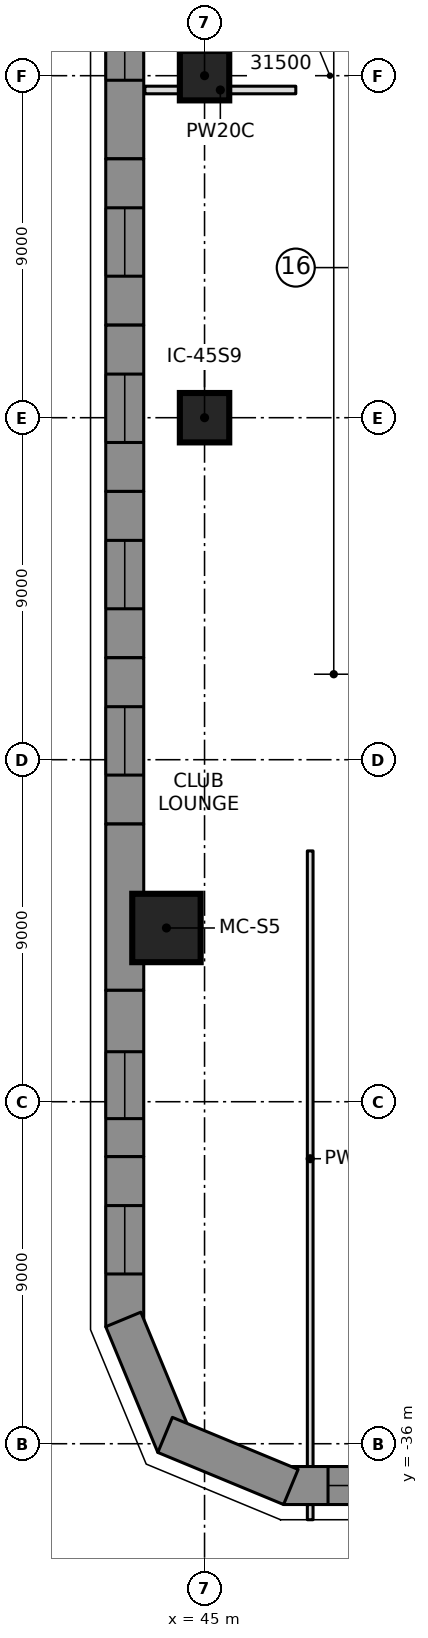
"""IFC4 building model, lengths in metres.
Left out: names, types, materials, properties, quantities, classifications, styles, units other than length and angle.
Written with IfcOpenShell. Run it as: python <this file> out.ifc"""

import sys

from ifc_helpers import new_model, si_unit, direction, frame, frame_2d, origin, origin_2d, place, context, subcontext, project, spatial, polyline, rectangle, outline, extrude, element, fill, save


model = new_model("IFC4")
c1 = context("Model", 3, precision=1e-05, world=origin(), true_north=direction((0.0, 1.0)))
c2 = subcontext(c1, "Body", "Model", "MODEL_VIEW")
j1 = project(units=[si_unit("LENGTHUNIT", "METRE"), si_unit("PLANEANGLEUNIT", "RADIAN")], contexts=[c1])
p1 = place(None, origin())
s1 = spatial("IfcSite", under=j1, at=p1, CompositionType="ELEMENT")
p2 = place(p1, origin())
s2 = spatial("IfcBuilding", under=s1, at=p2, CompositionType="ELEMENT")
p3 = place(p2, frame((0.0, 0.0, 24.0)))
s3 = spatial("IfcBuildingStorey", under=s2, at=p3, CompositionType="ELEMENT", Elevation=24.0)
p4 = place(p3, frame((43.998, -22.428, 0.0), z_axis=(0.0, 0.0, 1.0), x_axis=(1.0, 0.0, 0.0)))
e1 = element("IfcColumn", 1, at=p4, inside=s3, PredefinedType="COLUMN", context=c2, shape_type="SweptSolid", body=[
    extrude(rectangle(XDim=1.8, YDim=1.8, at=origin_2d()), origin(), (0.0, 0.0, 1.0), 5.0),
])
for number, where, z_axis, x_axis in (
    (2, (45.0, -9.0, 0.0), (0.0, 0.0, 1.0), (1.0, 0.0, 0.0)),
    (3, (45.0, 0.0, 0.0), (0.0, 0.0, 1.0), (1.0, 0.0, 0.0)),
):
    element("IfcColumn", number, at=place(p3, frame(where, z_axis=z_axis, x_axis=x_axis)), inside=s3, PredefinedType="COLUMN", context=c2, shape_type="SweptSolid", body=[
        extrude(rectangle(XDim=1.3, YDim=1.3, at=origin_2d()), origin(), (0.0, 0.0, 1.0), 5.0),
    ])
p5 = place(p3, frame((47.179, -37.1, 0.0), z_axis=(0.0, 0.0, 1.0), x_axis=(1.0, 0.0, 0.0)))
e4 = element("IfcWall", 4, at=p5, inside=s3, PredefinedType="NOTDEFINED", context=c2, shape_type="SweptSolid", body=[
    extrude(outline(polyline([(-0.1, -0.5), (3.94, -0.5), (3.94, 0.5), (0.1, 0.5), (-0.1, -0.5)])), origin(), (0.0, 0.0, 1.0), 4.7),
])
p6 = place(p5, frame((1.07, 0.0, 0.9)))
e5 = element("IfcOpeningElement", 5, at=p6, cuts=e4, PredefinedType="OPENING", context=c2, shape_type="SweptSolid", body=[
    extrude(rectangle(XDim=1.8, YDim=2.4, at=frame_2d((0.9, 1.2))), frame((0.0, 0.51, 0.0), z_axis=(0.0, -1.0, 0.0), x_axis=(1.0, 0.0, 0.0)), (0.0, 0.0, 1.0), 1.02),
])
p7 = place(p3, frame((42.9, 2.188, 0.0), z_axis=(0.0, 0.0, 1.0), x_axis=(0.0, -1.0, 0.0)))
e6 = element("IfcWall", 6, at=p7, inside=s3, PredefinedType="NOTDEFINED", context=c2, shape_type="SweptSolid", body=[
    extrude(outline(polyline([(0.0, -0.5), (4.376, -0.5), (4.376, 0.5), (0.0, 0.5), (0.0, -0.5)])), origin(), (0.0, 0.0, 1.0), 4.7),
])
p8 = place(p7, frame((0.508, 0.0, 0.9)))
e7 = element("IfcOpeningElement", 7, at=p8, cuts=e6, PredefinedType="OPENING", context=c2, shape_type="SweptSolid", body=[
    extrude(rectangle(XDim=1.8, YDim=2.4, at=frame_2d((0.9, 1.2))), frame((0.0, 0.51, 0.0), z_axis=(0.0, -1.0, 0.0), x_axis=(1.0, 0.0, 0.0)), (0.0, 0.0, 1.0), 1.02),
])
p9 = place(p3, frame((42.9, -2.188, 0.0), z_axis=(0.0, 0.0, 1.0), x_axis=(0.0, -1.0, 0.0)))
e8 = element("IfcWall", 8, at=p9, inside=s3, PredefinedType="NOTDEFINED", context=c2, shape_type="SweptSolid", body=[
    extrude(outline(polyline([(0.0, -0.5), (4.376, -0.5), (4.376, 0.5), (0.0, 0.5), (0.0, -0.5)])), origin(), (0.0, 0.0, 1.0), 4.7),
])
p10 = place(p9, frame((1.288, 0.0, 0.9)))
e9 = element("IfcOpeningElement", 9, at=p10, cuts=e8, PredefinedType="OPENING", context=c2, shape_type="SweptSolid", body=[
    extrude(rectangle(XDim=1.8, YDim=2.4, at=frame_2d((0.9, 1.2))), frame((0.0, 0.51, 0.0), z_axis=(0.0, -1.0, 0.0), x_axis=(1.0, 0.0, 0.0)), (0.0, 0.0, 1.0), 1.02),
])
p11 = place(p3, frame((42.9, -6.564, 0.0), z_axis=(0.0, 0.0, 1.0), x_axis=(0.0, -1.0, 0.0)))
e10 = element("IfcWall", 10, at=p11, inside=s3, PredefinedType="NOTDEFINED", context=c2, shape_type="SweptSolid", body=[
    extrude(outline(polyline([(0.0, -0.5), (4.376, -0.5), (4.376, 0.5), (0.0, 0.5), (0.0, -0.5)])), origin(), (0.0, 0.0, 1.0), 4.7),
])
p12 = place(p11, frame((1.288, 0.0, 0.9)))
e11 = element("IfcOpeningElement", 11, at=p12, cuts=e10, PredefinedType="OPENING", context=c2, shape_type="SweptSolid", body=[
    extrude(rectangle(XDim=1.8, YDim=2.4, at=frame_2d((0.9, 1.2))), frame((0.0, 0.51, 0.0), z_axis=(0.0, -1.0, 0.0), x_axis=(1.0, 0.0, 0.0)), (0.0, 0.0, 1.0), 1.02),
])
p13 = place(p3, frame((42.9, -10.94, 0.0), z_axis=(0.0, 0.0, 1.0), x_axis=(0.0, -1.0, 0.0)))
e12 = element("IfcWall", 12, at=p13, inside=s3, PredefinedType="NOTDEFINED", context=c2, shape_type="SweptSolid", body=[
    extrude(outline(polyline([(0.0, -0.5), (4.376, -0.5), (4.376, 0.5), (0.0, 0.5), (0.0, -0.5)])), origin(), (0.0, 0.0, 1.0), 4.7),
])
p14 = place(p13, frame((1.288, 0.0, 0.9)))
e13 = element("IfcOpeningElement", 13, at=p14, cuts=e12, PredefinedType="OPENING", context=c2, shape_type="SweptSolid", body=[
    extrude(rectangle(XDim=1.8, YDim=2.4, at=frame_2d((0.9, 1.2))), frame((0.0, 0.51, 0.0), z_axis=(0.0, -1.0, 0.0), x_axis=(1.0, 0.0, 0.0)), (0.0, 0.0, 1.0), 1.02),
])
p15 = place(p3, frame((42.9, -15.316, 0.0), z_axis=(0.0, 0.0, 1.0), x_axis=(0.0, -1.0, 0.0)))
e14 = element("IfcWall", 14, at=p15, inside=s3, PredefinedType="NOTDEFINED", context=c2, shape_type="SweptSolid", body=[
    extrude(outline(polyline([(0.0, -0.5), (4.376, -0.5), (4.376, 0.5), (0.0, 0.5), (0.0, -0.5)])), origin(), (0.0, 0.0, 1.0), 4.7),
])
p16 = place(p15, frame((1.288, 0.0, 0.9)))
e15 = element("IfcOpeningElement", 15, at=p16, cuts=e14, PredefinedType="OPENING", context=c2, shape_type="SweptSolid", body=[
    extrude(rectangle(XDim=1.8, YDim=2.4, at=frame_2d((0.9, 1.2))), frame((0.0, 0.51, 0.0), z_axis=(0.0, -1.0, 0.0), x_axis=(1.0, 0.0, 0.0)), (0.0, 0.0, 1.0), 1.02),
])
p17 = place(p3, frame((42.9, -19.693, 0.0), z_axis=(0.0, 0.0, 1.0), x_axis=(0.0, -1.0, 0.0)))
e16 = element("IfcWall", 16, at=p17, inside=s3, PredefinedType="NOTDEFINED", context=c2, shape_type="SweptSolid", body=[
    extrude(outline(polyline([(0.0, -0.5), (4.376, -0.5), (4.376, 0.5), (0.0, 0.5), (0.0, -0.5)])), origin(), (0.0, 0.0, 1.0), 4.7),
])
p18 = place(p3, frame((42.9, -24.069, 0.0), z_axis=(0.0, 0.0, 1.0), x_axis=(0.0, -1.0, 0.0)))
e17 = element("IfcWall", 17, at=p18, inside=s3, PredefinedType="NOTDEFINED", context=c2, shape_type="SweptSolid", body=[
    extrude(outline(polyline([(0.0, -0.5), (4.376, -0.5), (4.376, 0.5), (0.0, 0.5), (0.0, -0.5)])), origin(), (0.0, 0.0, 1.0), 4.7),
])
p19 = place(p18, frame((1.615, 0.0, 0.9)))
e18 = element("IfcOpeningElement", 18, at=p19, cuts=e17, PredefinedType="OPENING", context=c2, shape_type="SweptSolid", body=[
    extrude(rectangle(XDim=1.76, YDim=2.4, at=frame_2d((0.88, 1.2))), frame((0.0, 0.51, 0.0), z_axis=(0.0, -1.0, 0.0), x_axis=(1.0, 0.0, 0.0)), (0.0, 0.0, 1.0), 1.02),
])
p20 = place(p3, frame((42.9, -28.445, 0.0), z_axis=(0.0, 0.0, 1.0), x_axis=(0.0, -1.0, 0.0)))
e19 = element("IfcWall", 19, at=p20, inside=s3, PredefinedType="NOTDEFINED", context=c2, shape_type="SweptSolid", body=[
    extrude(outline(polyline([(0.0, -0.5), (4.476, -0.5), (4.277, 0.5), (0.0, 0.5), (0.0, -0.5)])), origin(), (0.0, 0.0, 1.0), 4.7),
])
p21 = place(p20, frame((1.288, 0.0, 0.9)))
e20 = element("IfcOpeningElement", 20, at=p21, cuts=e19, PredefinedType="OPENING", context=c2, shape_type="SweptSolid", body=[
    extrude(rectangle(XDim=1.8, YDim=2.4, at=frame_2d((0.9, 1.2))), frame((0.0, 0.51, 0.0), z_axis=(0.0, -1.0, 0.0), x_axis=(1.0, 0.0, 0.0)), (0.0, 0.0, 1.0), 1.02),
])
p22 = place(p3, frame((42.9, -32.821, 0.0), z_axis=(0.0, 0.0, 1.0), x_axis=(0.382724875529, -0.923862365102, 0.0)))
e21 = element("IfcWall", 21, at=p22, inside=s3, PredefinedType="NOTDEFINED", context=c2, shape_type="SweptSolid", body=[
    extrude(outline(polyline([(-0.1, -0.5), (3.482, -0.5), (3.068, 0.5), (0.1, 0.5), (-0.1, -0.5)])), origin(), (0.0, 0.0, 1.0), 4.7),
])
p23 = place(p3, frame((44.153, -35.847, 0.0), z_axis=(0.0, 0.0, 1.0), x_axis=(0.923862365102, -0.382724875529, 0.0)))
e22 = element("IfcWall", 22, at=p23, inside=s3, PredefinedType="NOTDEFINED", context=c2, shape_type="SweptSolid", body=[
    extrude(outline(polyline([(-0.207, -0.5), (3.375, -0.5), (3.175, 0.5), (0.207, 0.5), (-0.207, -0.5)])), origin(), (0.0, 0.0, 1.0), 4.7),
])
p24 = place(p3, frame((43.43, -0.376, 0.0), z_axis=(0.0, 0.0, 1.0), x_axis=(1.0, 0.0, 0.0)))
e23 = element("IfcWall", 23, at=p24, inside=s3, PredefinedType="PARTITIONING", context=c2, shape_type="SweptSolid", body=[
    extrude(rectangle(XDim=3.971, YDim=0.2, at=frame_2d((1.985, 0.0))), origin(), (0.0, 0.0, 1.0), 4.55),
])
p25 = place(p3, frame((47.78, -38.0, 0.0), z_axis=(0.0, 0.0, 1.0), x_axis=(0.0, 1.0, 0.0)))
e24 = element("IfcWall", 24, at=p25, inside=s3, PredefinedType="PARTITIONING", context=c2, shape_type="SweptSolid", body=[
    extrude(rectangle(XDim=0.4, YDim=0.15, at=frame_2d((0.2, 0.0))), origin(), (0.0, 0.0, 1.0), 4.55),
])
p26 = place(p3, frame((47.78, -36.6, 0.0), z_axis=(0.0, 0.0, 1.0), x_axis=(0.0, 1.0, 0.0)))
e25 = element("IfcWall", 25, at=p26, inside=s3, PredefinedType="PARTITIONING", context=c2, shape_type="SweptSolid", body=[
    extrude(rectangle(XDim=16.2, YDim=0.15, at=frame_2d((8.1, 0.0))), origin(), (0.0, 0.0, 1.0), 4.55),
])
p27 = place(p6, origin())
e26 = element("IfcWindow", 26, at=p27, inside=s3, PartitioningType="SINGLE_PANEL", PredefinedType="WINDOW", context=c2, shape_type="SweptSolid", body=[
    extrude(rectangle(XDim=1.8, YDim=2.4, at=frame_2d((0.9, 1.2))), frame((0.0, 0.5, 0.0), z_axis=(0.0, -1.0, 0.0), x_axis=(1.0, 0.0, 0.0)), (0.0, 0.0, 1.0), 0.06),
])
fill(e5, e26)
p28 = place(p8, origin())
e27 = element("IfcWindow", 27, at=p28, inside=s3, PartitioningType="SINGLE_PANEL", PredefinedType="WINDOW", context=c2, shape_type="SweptSolid", body=[
    extrude(rectangle(XDim=1.8, YDim=2.4, at=frame_2d((0.9, 1.2))), frame((0.0, 0.5, 0.0), z_axis=(0.0, -1.0, 0.0), x_axis=(1.0, 0.0, 0.0)), (0.0, 0.0, 1.0), 0.06),
])
fill(e7, e27)
p29 = place(p10, origin())
e28 = element("IfcWindow", 28, at=p29, inside=s3, PartitioningType="SINGLE_PANEL", PredefinedType="WINDOW", context=c2, shape_type="SweptSolid", body=[
    extrude(rectangle(XDim=1.8, YDim=2.4, at=frame_2d((0.9, 1.2))), frame((0.0, 0.5, 0.0), z_axis=(0.0, -1.0, 0.0), x_axis=(1.0, 0.0, 0.0)), (0.0, 0.0, 1.0), 0.06),
])
fill(e9, e28)
p30 = place(p12, origin())
e29 = element("IfcWindow", 29, at=p30, inside=s3, PartitioningType="SINGLE_PANEL", PredefinedType="WINDOW", context=c2, shape_type="SweptSolid", body=[
    extrude(rectangle(XDim=1.8, YDim=2.4, at=frame_2d((0.9, 1.2))), frame((0.0, 0.5, 0.0), z_axis=(0.0, -1.0, 0.0), x_axis=(1.0, 0.0, 0.0)), (0.0, 0.0, 1.0), 0.06),
])
fill(e11, e29)
p31 = place(p14, origin())
e30 = element("IfcWindow", 30, at=p31, inside=s3, PartitioningType="SINGLE_PANEL", PredefinedType="WINDOW", context=c2, shape_type="SweptSolid", body=[
    extrude(rectangle(XDim=1.8, YDim=2.4, at=frame_2d((0.9, 1.2))), frame((0.0, 0.5, 0.0), z_axis=(0.0, -1.0, 0.0), x_axis=(1.0, 0.0, 0.0)), (0.0, 0.0, 1.0), 0.06),
])
fill(e13, e30)
p32 = place(p16, origin())
e31 = element("IfcWindow", 31, at=p32, inside=s3, PartitioningType="SINGLE_PANEL", PredefinedType="WINDOW", context=c2, shape_type="SweptSolid", body=[
    extrude(rectangle(XDim=1.8, YDim=2.4, at=frame_2d((0.9, 1.2))), frame((0.0, 0.5, 0.0), z_axis=(0.0, -1.0, 0.0), x_axis=(1.0, 0.0, 0.0)), (0.0, 0.0, 1.0), 0.06),
])
fill(e15, e31)
p33 = place(p19, origin())
e32 = element("IfcWindow", 32, at=p33, inside=s3, PartitioningType="SINGLE_PANEL", PredefinedType="WINDOW", context=c2, shape_type="SweptSolid", body=[
    extrude(rectangle(XDim=1.76, YDim=2.4, at=frame_2d((0.88, 1.2))), frame((0.0, 0.5, 0.0), z_axis=(0.0, -1.0, 0.0), x_axis=(1.0, 0.0, 0.0)), (0.0, 0.0, 1.0), 0.06),
])
fill(e18, e32)
p34 = place(p21, origin())
e33 = element("IfcWindow", 33, at=p34, inside=s3, PartitioningType="SINGLE_PANEL", PredefinedType="WINDOW", context=c2, shape_type="SweptSolid", body=[
    extrude(rectangle(XDim=1.8, YDim=2.4, at=frame_2d((0.9, 1.2))), frame((0.0, 0.5, 0.0), z_axis=(0.0, -1.0, 0.0), x_axis=(1.0, 0.0, 0.0)), (0.0, 0.0, 1.0), 0.06),
])
fill(e20, e33)
save(model, sys.argv[1])
